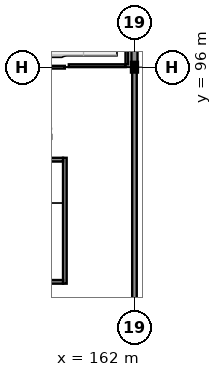
"""IFC4 building model, lengths in metres.
Left out: names, types, materials, properties, quantities, classifications, styles, units other than length and angle.
Written with IfcOpenShell. Run it as: python <this file> out.ifc"""

import sys

from ifc_helpers import new_model, si_unit, direction, frame, frame_2d, origin, origin_2d, place, context, subcontext, project, spatial, rectangle, i_section, extrude, element, fill, save


model = new_model("IFC4")
c1 = context("Model", 3, precision=1e-05, world=origin(), true_north=direction((0.0, 1.0)))
c2 = subcontext(c1, "Body", "Model", "MODEL_VIEW")
j1 = project(units=[si_unit("LENGTHUNIT", "METRE"), si_unit("PLANEANGLEUNIT", "RADIAN")], contexts=[c1])
p1 = place(None, origin())
s1 = spatial("IfcSite", under=j1, at=p1, CompositionType="ELEMENT")
p2 = place(p1, origin())
s2 = spatial("IfcBuilding", under=s1, at=p2, CompositionType="ELEMENT")
p3 = place(p2, frame((0.0, 0.0, 5.4)))
s3 = spatial("IfcBuildingStorey", under=s2, at=p3, CompositionType="ELEMENT", Elevation=5.4)
p4 = place(p3, frame((162.0, 96.0, 0.0), z_axis=(0.0, 0.0, 1.0), x_axis=(1.0, 0.0, 0.0)))
e1 = element("IfcColumn", 1, at=p4, inside=s3, PredefinedType="COLUMN", context=c2, shape_type="SweptSolid", body=[
    extrude(i_section(OverallWidth=0.3, OverallDepth=0.55, WebThickness=0.015, FlangeThickness=0.029, at=origin_2d()), origin(), (0.0, 0.0, 1.0), 4.5),
])
p5 = place(p3, frame((162.0, 78.273, 0.0), z_axis=(0.0, 0.0, 1.0), x_axis=(0.0, 1.0, 0.0)))
e2 = element("IfcWall", 2, at=p5, inside=s3, PredefinedType="SOLIDWALL", context=c2, shape_type="SweptSolid", body=[
    extrude(rectangle(XDim=17.454, YDim=0.3, at=frame_2d((8.727, 0.0))), origin(), (0.0, 0.0, 1.0), 3.545),
])
p6 = place(p5, frame((4.586, 0.0, 0.9)))
e3 = element("IfcOpeningElement", 3, at=p6, cuts=e2, PredefinedType="OPENING", context=c2, shape_type="SweptSolid", body=[
    extrude(rectangle(XDim=1.3, YDim=1.3, at=frame_2d((0.65, 0.65))), frame((0.0, 0.165, 0.0), z_axis=(0.0, -1.0, 0.0), x_axis=(1.0, 0.0, 0.0)), (0.0, 0.0, 1.0), 0.33),
])
p7 = place(p5, frame((11.568, 0.0, 0.9)))
e4 = element("IfcOpeningElement", 4, at=p7, cuts=e2, PredefinedType="OPENING", context=c2, shape_type="SweptSolid", body=[
    extrude(rectangle(XDim=1.3, YDim=1.3, at=frame_2d((0.65, 0.65))), frame((0.0, 0.165, 0.0), z_axis=(0.0, -1.0, 0.0), x_axis=(1.0, 0.0, 0.0)), (0.0, 0.0, 1.0), 0.33),
])
p8 = place(p3, frame((162.0, 96.273, 0.0), z_axis=(0.0, 0.0, 1.0), x_axis=(0.0, 1.0, 0.0)))
e5 = element("IfcWall", 5, at=p8, inside=s3, PredefinedType="SOLIDWALL", context=c2, shape_type="SweptSolid", body=[
    extrude(rectangle(XDim=11.599, YDim=0.4, at=frame_2d((5.8, 0.0))), origin(), (0.0, 0.0, 1.0), 4.18),
])
p9 = place(p8, frame((2.88, 0.0, 2.35)))
e6 = element("IfcOpeningElement", 6, at=p9, cuts=e5, PredefinedType="OPENING", context=c2, shape_type="SweptSolid", body=[
    extrude(rectangle(XDim=1.2, YDim=0.7, at=frame_2d((0.6, 0.35))), frame((0.0, 0.215, 0.0), z_axis=(0.0, -1.0, 0.0), x_axis=(1.0, 0.0, 0.0)), (0.0, 0.0, 1.0), 0.43),
])
p10 = place(p8, frame((7.519, 0.0, 2.35)))
e7 = element("IfcOpeningElement", 7, at=p10, cuts=e5, PredefinedType="OPENING", context=c2, shape_type="SweptSolid", body=[
    extrude(rectangle(XDim=1.2, YDim=0.7, at=frame_2d((0.6, 0.35))), frame((0.0, 0.215, 0.0), z_axis=(0.0, -1.0, 0.0), x_axis=(1.0, 0.0, 0.0)), (0.0, 0.0, 1.0), 0.43),
])
p11 = place(p3, frame((157.42, 81.76, 0.0), z_axis=(0.0, 0.0, 1.0), x_axis=(0.0, 1.0, 0.0)))
e8 = element("IfcWall", 8, at=p11, inside=s3, PredefinedType="SHEAR", context=c2, shape_type="SweptSolid", body=[
    extrude(rectangle(XDim=8.28, YDim=0.24, at=frame_2d((4.14, 0.0))), origin(), (0.0, 0.0, 1.0), 4.31),
])
p12 = place(p11, frame((0.49, 0.0, 0.0)))
e9 = element("IfcOpeningElement", 9, at=p12, cuts=e8, PredefinedType="OPENING", context=c2, shape_type="SweptSolid", body=[
    extrude(rectangle(XDim=1.3, YDim=2.2, at=frame_2d((0.65, 1.1))), frame((0.0, 0.135, 0.0), z_axis=(0.0, -1.0, 0.0), x_axis=(1.0, 0.0, 0.0)), (0.0, 0.0, 1.0), 0.27),
])
for number, where, z_axis, x_axis in (
    (10, (153.6, 81.88, 0.0), (0.0, 0.0, 1.0), (1.0, 0.0, 0.0)),
    (11, (153.6, 89.92, 0.0), (0.0, 0.0, 1.0), (1.0, 0.0, 0.0)),
):
    element("IfcWall", number, at=place(p3, frame(where, z_axis=z_axis, x_axis=x_axis)), inside=s3, PredefinedType="SHEAR", context=c2, shape_type="SweptSolid", body=[
        extrude(rectangle(XDim=3.7, YDim=0.24, at=frame_2d((1.85, 0.0))), origin(), (0.0, 0.0, 1.0), 4.31),
    ])
p13 = place(p3, frame((157.42, 96.0, 0.0), z_axis=(0.0, 0.0, 1.0), x_axis=(-1.0, 0.0, 0.0)))
e12 = element("IfcWall", 12, at=p13, inside=s3, PredefinedType="PARTITIONING", context=c2, shape_type="SweptSolid", body=[
    extrude(rectangle(XDim=31.34, YDim=0.18, at=frame_2d((15.67, 0.0))), origin(), (0.0, 0.0, 1.0), 3.187),
])
p14 = place(p3, frame((161.5, 111.92, 0.0), z_axis=(0.0, 0.0, 1.0), x_axis=(0.0, -1.0, 0.0)))
e13 = element("IfcWall", 13, at=p14, inside=s3, PredefinedType="PARTITIONING", context=c2, shape_type="SweptSolid", body=[
    extrude(rectangle(XDim=15.74, YDim=0.18, at=frame_2d((7.87, 0.0))), origin(), (0.0, 0.0, 1.0), 4.14),
])
p15 = place(p3, frame((161.42, 96.1, 0.0), z_axis=(0.0, 0.0, 1.0), x_axis=(-1.0, 0.0, 0.0)))
e14 = element("IfcWall", 14, at=p15, inside=s3, PredefinedType="PARTITIONING", context=c2, shape_type="SweptSolid", body=[
    extrude(rectangle(XDim=3.74, YDim=0.18, at=frame_2d((1.87, 0.0))), origin(), (0.0, 0.0, 1.0), 3.187),
])
p16 = place(p15, frame((1.295, 0.0, 0.0)))
e15 = element("IfcOpeningElement", 15, at=p16, cuts=e14, PredefinedType="OPENING", context=c2, shape_type="SweptSolid", body=[
    extrude(rectangle(XDim=1.15, YDim=2.15, at=frame_2d((0.575, 1.075))), frame((0.0, 0.105, 0.0), z_axis=(0.0, -1.0, 0.0), x_axis=(1.0, 0.0, 0.0)), (0.0, 0.0, 1.0), 0.21),
])
p17 = place(p6, origin())
e16 = element("IfcWindow", 16, at=p17, inside=s3, PartitioningType="SINGLE_PANEL", PredefinedType="WINDOW", context=c2, shape_type="SweptSolid", body=[
    extrude(rectangle(XDim=1.3, YDim=1.3, at=frame_2d((0.65, 0.65))), frame((0.0, 0.03, 0.0), z_axis=(0.0, -1.0, 0.0), x_axis=(1.0, 0.0, 0.0)), (0.0, 0.0, 1.0), 0.06),
])
fill(e3, e16)
p18 = place(p7, origin())
e17 = element("IfcWindow", 17, at=p18, inside=s3, PartitioningType="SINGLE_PANEL", PredefinedType="WINDOW", context=c2, shape_type="SweptSolid", body=[
    extrude(rectangle(XDim=1.3, YDim=1.3, at=frame_2d((0.65, 0.65))), frame((0.0, 0.03, 0.0), z_axis=(0.0, -1.0, 0.0), x_axis=(1.0, 0.0, 0.0)), (0.0, 0.0, 1.0), 0.06),
])
fill(e4, e17)
p19 = place(p12, frame((1.3, 0.0, 0.0), z_axis=(0.0, 0.0, 1.0), x_axis=(-1.0, 0.0, 0.0)))
e18 = element("IfcDoor", 18, at=p19, inside=s3, OperationType="SINGLE_SWING_RIGHT", PredefinedType="DOOR", context=c2, shape_type="SweptSolid", body=[
    extrude(rectangle(XDim=1.3, YDim=2.2, at=frame_2d((0.65, 1.1))), frame((0.0, 0.025, 0.0), z_axis=(0.0, -1.0, 0.0), x_axis=(1.0, 0.0, 0.0)), (0.0, 0.0, 1.0), 0.05),
])
fill(e9, e18)
p20 = place(p16, origin())
e19 = element("IfcDoor", 19, at=p20, inside=s3, OperationType="SINGLE_SWING_LEFT", PredefinedType="DOOR", context=c2, shape_type="SweptSolid", body=[
    extrude(rectangle(XDim=1.15, YDim=2.15, at=frame_2d((0.575, 1.075))), frame((0.0, 0.025, 0.0), z_axis=(0.0, -1.0, 0.0), x_axis=(1.0, 0.0, 0.0)), (0.0, 0.0, 1.0), 0.05),
])
fill(e15, e19)
save(model, sys.argv[1])
